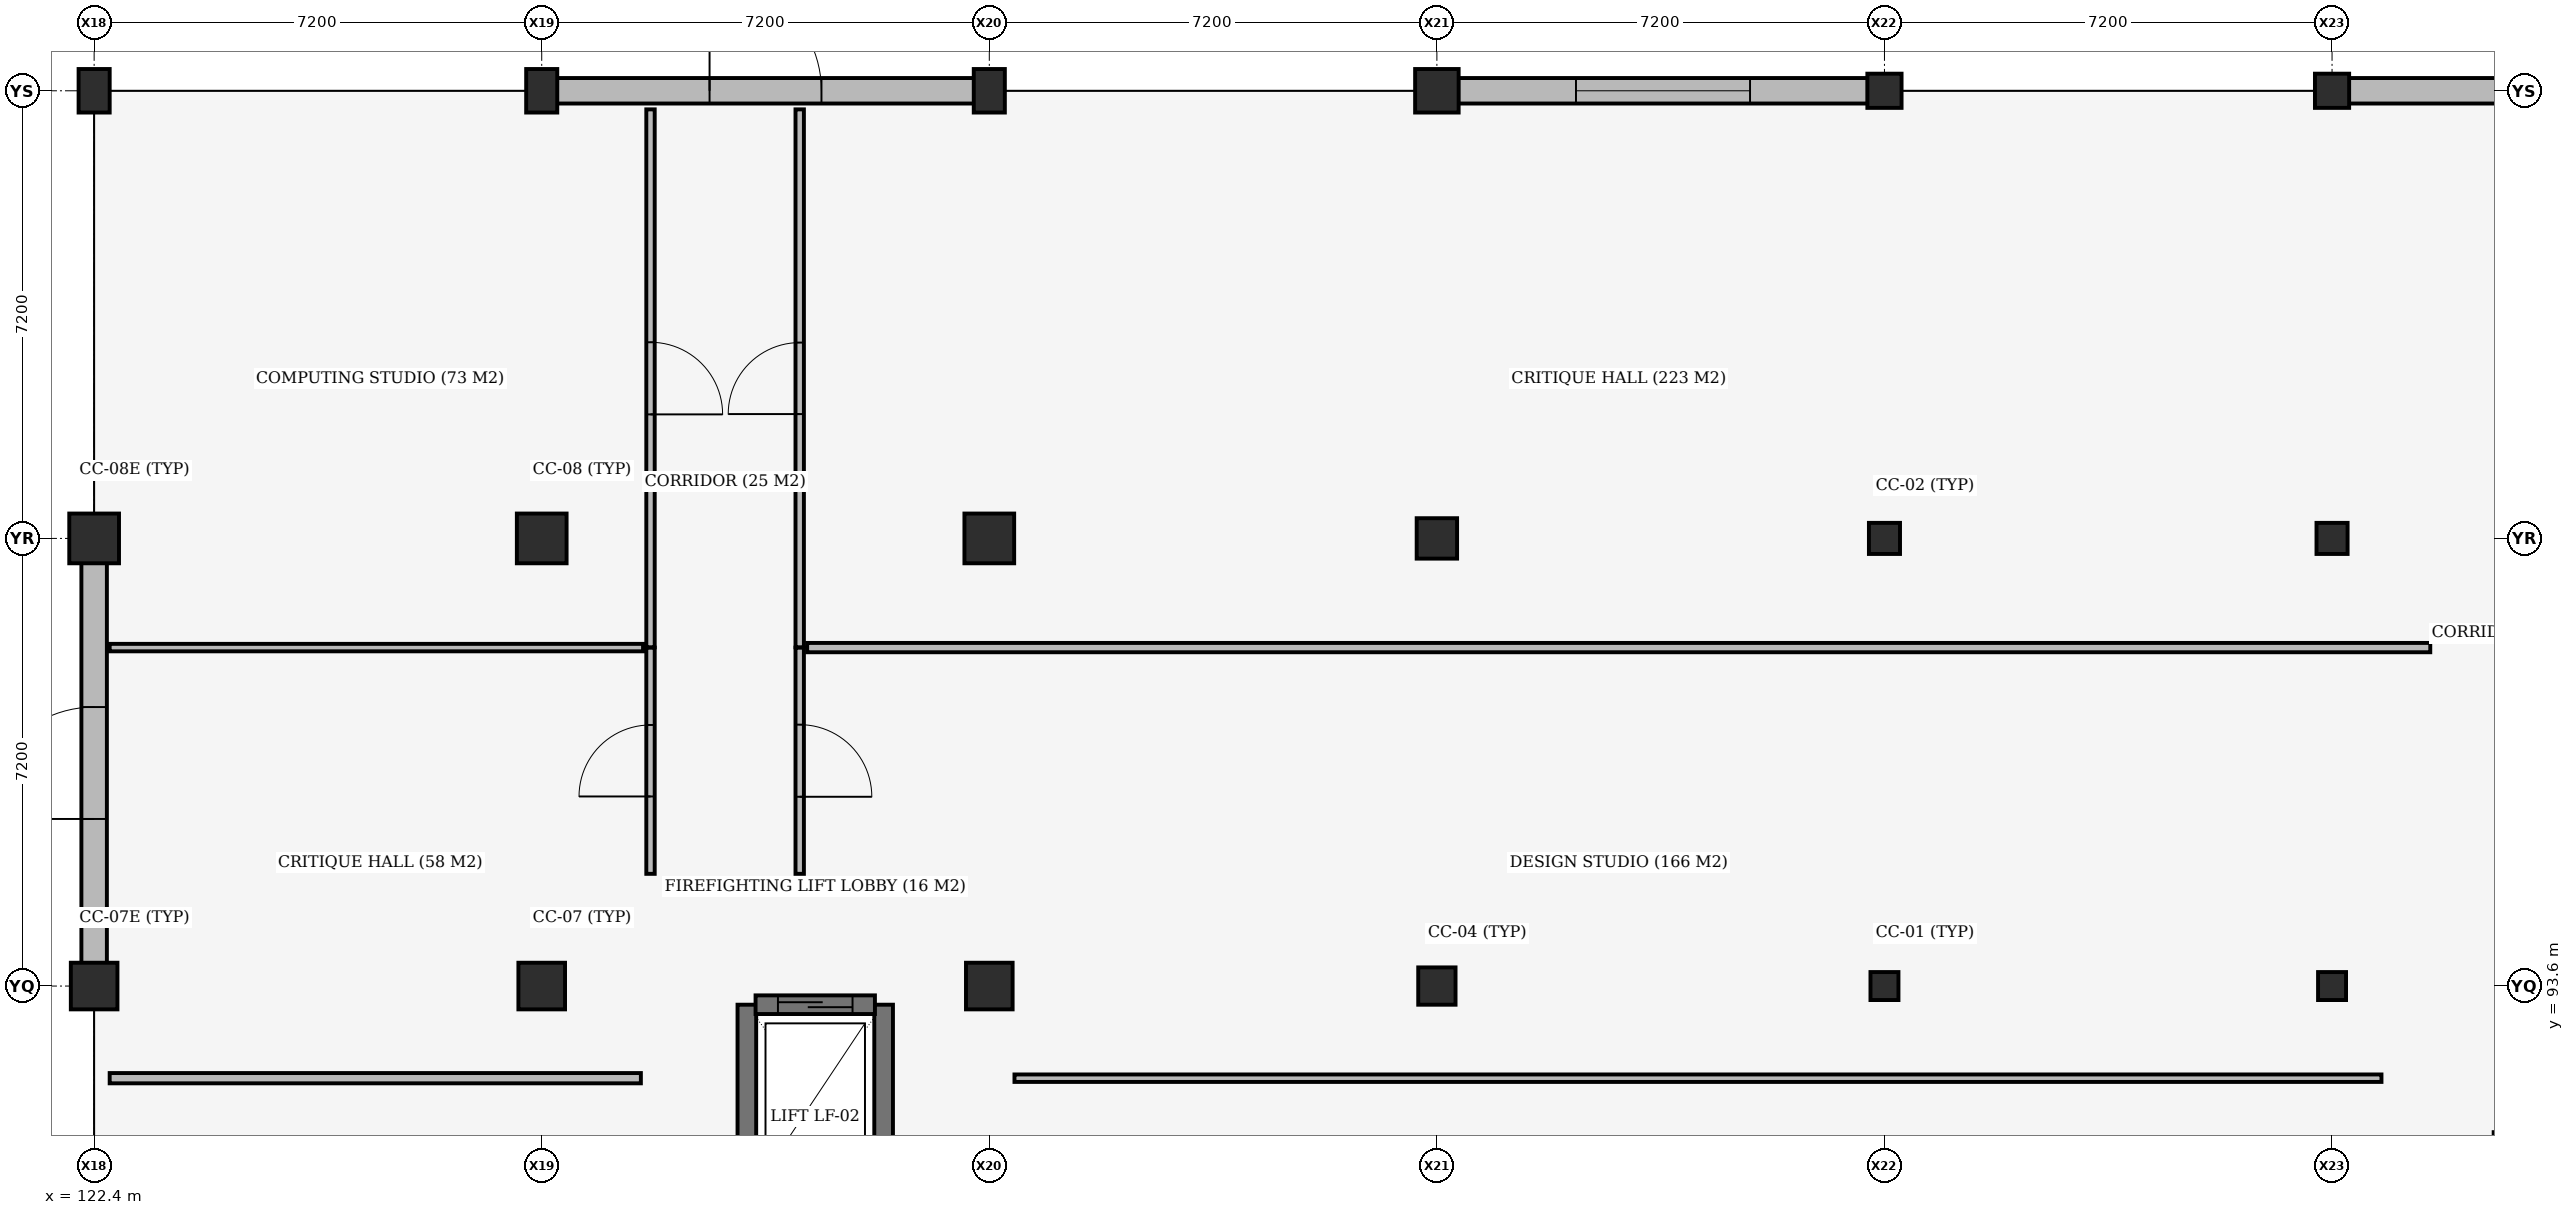
"""IFC4 building model, lengths in metres.
Left out: names, types, materials, properties, quantities, classifications, styles, units other than length and angle.
Written with IfcOpenShell. Run it as: python <this file> out.ifc"""

import sys

from ifc_helpers import new_model, si_unit, direction, frame, frame_2d, origin, origin_2d, place, context, subcontext, project, spatial, rectangle, extrude, element, fill, save


model = new_model("IFC4")
c1 = context("Model", 3, precision=1e-05, world=origin(), true_north=direction((0.0, 1.0)))
c2 = subcontext(c1, "Body", "Model", "MODEL_VIEW")
j1 = project(units=[si_unit("LENGTHUNIT", "METRE"), si_unit("PLANEANGLEUNIT", "RADIAN")], contexts=[c1])
p1 = place(None, origin())
s1 = spatial("IfcSite", under=j1, at=p1, CompositionType="ELEMENT")
p2 = place(p1, origin())
s2 = spatial("IfcBuilding", under=s1, at=p2, CompositionType="ELEMENT")
p3 = place(p2, origin())
s3 = spatial("IfcBuildingStorey", under=s2, at=p3, CompositionType="ELEMENT", Elevation=0.0)
p4 = place(p3, frame((122.4, 93.6, 0.0), z_axis=(0.0, 0.0, 1.0), x_axis=(1.0, 0.0, 0.0)))
e1 = element("IfcColumn", 1, at=p4, inside=s3, PredefinedType="COLUMN", context=c2, shape_type="SweptSolid", body=[
    extrude(rectangle(XDim=0.75, YDim=0.75, at=origin_2d()), origin(), (0.0, 0.0, 1.0), 5.1),
])
p5 = place(p3, frame((122.4, 100.8, 0.0), z_axis=(0.0, 0.0, 1.0), x_axis=(1.0, 0.0, 0.0)))
e2 = element("IfcColumn", 2, at=p5, inside=s3, PredefinedType="COLUMN", context=c2, shape_type="SweptSolid", body=[
    extrude(rectangle(XDim=0.8, YDim=0.8, at=origin_2d()), origin(), (0.0, 0.0, 1.0), 5.1),
])
p6 = place(p3, frame((122.4, 108.0, 0.0), z_axis=(0.0, 0.0, 1.0), x_axis=(1.0, 0.0, 0.0)))
e3 = element("IfcColumn", 3, at=p6, inside=s3, PredefinedType="COLUMN", context=c2, shape_type="SweptSolid", body=[
    extrude(rectangle(XDim=0.5, YDim=0.7, at=origin_2d()), origin(), (0.0, 0.0, 1.0), 5.1),
])
p7 = place(p3, frame((129.6, 93.6, 0.0), z_axis=(0.0, 0.0, 1.0), x_axis=(1.0, 0.0, 0.0)))
e4 = element("IfcColumn", 4, at=p7, inside=s3, PredefinedType="COLUMN", context=c2, shape_type="SweptSolid", body=[
    extrude(rectangle(XDim=0.75, YDim=0.75, at=origin_2d()), origin(), (0.0, 0.0, 1.0), 5.1),
])
p8 = place(p3, frame((129.6, 100.8, 0.0), z_axis=(0.0, 0.0, 1.0), x_axis=(1.0, 0.0, 0.0)))
e5 = element("IfcColumn", 5, at=p8, inside=s3, PredefinedType="COLUMN", context=c2, shape_type="SweptSolid", body=[
    extrude(rectangle(XDim=0.8, YDim=0.8, at=origin_2d()), origin(), (0.0, 0.0, 1.0), 5.1),
])
p9 = place(p3, frame((129.6, 108.0, 0.0), z_axis=(0.0, 0.0, 1.0), x_axis=(1.0, 0.0, 0.0)))
e6 = element("IfcColumn", 6, at=p9, inside=s3, PredefinedType="COLUMN", context=c2, shape_type="SweptSolid", body=[
    extrude(rectangle(XDim=0.5, YDim=0.7, at=origin_2d()), origin(), (0.0, 0.0, 1.0), 5.1),
])
p10 = place(p3, frame((136.8, 93.6, 0.0), z_axis=(0.0, 0.0, 1.0), x_axis=(1.0, 0.0, 0.0)))
e7 = element("IfcColumn", 7, at=p10, inside=s3, PredefinedType="COLUMN", context=c2, shape_type="SweptSolid", body=[
    extrude(rectangle(XDim=0.75, YDim=0.75, at=origin_2d()), origin(), (0.0, 0.0, 1.0), 5.1),
])
p11 = place(p3, frame((136.8, 100.8, 0.0), z_axis=(0.0, 0.0, 1.0), x_axis=(1.0, 0.0, 0.0)))
e8 = element("IfcColumn", 8, at=p11, inside=s3, PredefinedType="COLUMN", context=c2, shape_type="SweptSolid", body=[
    extrude(rectangle(XDim=0.8, YDim=0.8, at=origin_2d()), origin(), (0.0, 0.0, 1.0), 5.1),
])
p12 = place(p3, frame((136.8, 108.0, 0.0), z_axis=(0.0, 0.0, 1.0), x_axis=(1.0, 0.0, 0.0)))
e9 = element("IfcColumn", 9, at=p12, inside=s3, PredefinedType="COLUMN", context=c2, shape_type="SweptSolid", body=[
    extrude(rectangle(XDim=0.5, YDim=0.7, at=origin_2d()), origin(), (0.0, 0.0, 1.0), 5.1),
])
p13 = place(p3, frame((144.0, 93.6, 0.0), z_axis=(0.0, 0.0, 1.0), x_axis=(1.0, 0.0, 0.0)))
e10 = element("IfcColumn", 10, at=p13, inside=s3, PredefinedType="COLUMN", context=c2, shape_type="SweptSolid", body=[
    extrude(rectangle(XDim=0.6, YDim=0.6, at=origin_2d()), origin(), (0.0, 0.0, 1.0), 5.1),
])
p14 = place(p3, frame((144.0, 100.8, 0.0), z_axis=(0.0, 0.0, 1.0), x_axis=(1.0, 0.0, 0.0)))
e11 = element("IfcColumn", 11, at=p14, inside=s3, PredefinedType="COLUMN", context=c2, shape_type="SweptSolid", body=[
    extrude(rectangle(XDim=0.65, YDim=0.65, at=origin_2d()), origin(), (0.0, 0.0, 1.0), 5.1),
])
p15 = place(p3, frame((144.0, 108.0, 0.0), z_axis=(0.0, 0.0, 1.0), x_axis=(1.0, 0.0, 0.0)))
e12 = element("IfcColumn", 12, at=p15, inside=s3, PredefinedType="COLUMN", context=c2, shape_type="SweptSolid", body=[
    extrude(rectangle(XDim=0.7, YDim=0.7, at=origin_2d()), origin(), (0.0, 0.0, 1.0), 5.1),
])
p16 = place(p3, frame((151.2, 93.6, 0.0), z_axis=(0.0, 0.0, 1.0), x_axis=(1.0, 0.0, 0.0)))
e13 = element("IfcColumn", 13, at=p16, inside=s3, PredefinedType="COLUMN", context=c2, shape_type="SweptSolid", body=[
    extrude(rectangle(XDim=0.45, YDim=0.45, at=origin_2d()), origin(), (0.0, 0.0, 1.0), 5.1),
])
p17 = place(p3, frame((151.2, 100.8, 0.0), z_axis=(0.0, 0.0, 1.0), x_axis=(1.0, 0.0, 0.0)))
e14 = element("IfcColumn", 14, at=p17, inside=s3, PredefinedType="COLUMN", context=c2, shape_type="SweptSolid", body=[
    extrude(rectangle(XDim=0.5, YDim=0.5, at=origin_2d()), origin(), (0.0, 0.0, 1.0), 5.1),
])
p18 = place(p3, frame((151.2, 108.0, 0.0), z_axis=(0.0, 0.0, 1.0), x_axis=(1.0, 0.0, 0.0)))
e15 = element("IfcColumn", 15, at=p18, inside=s3, PredefinedType="COLUMN", context=c2, shape_type="SweptSolid", body=[
    extrude(rectangle(XDim=0.55, YDim=0.55, at=origin_2d()), origin(), (0.0, 0.0, 1.0), 5.1),
])
p19 = place(p3, frame((158.4, 93.6, 0.0), z_axis=(0.0, 0.0, 1.0), x_axis=(1.0, 0.0, 0.0)))
e16 = element("IfcColumn", 16, at=p19, inside=s3, PredefinedType="COLUMN", context=c2, shape_type="SweptSolid", body=[
    extrude(rectangle(XDim=0.45, YDim=0.45, at=origin_2d()), origin(), (0.0, 0.0, 1.0), 5.1),
])
p20 = place(p3, frame((158.4, 100.8, 0.0), z_axis=(0.0, 0.0, 1.0), x_axis=(1.0, 0.0, 0.0)))
e17 = element("IfcColumn", 17, at=p20, inside=s3, PredefinedType="COLUMN", context=c2, shape_type="SweptSolid", body=[
    extrude(rectangle(XDim=0.5, YDim=0.5, at=origin_2d()), origin(), (0.0, 0.0, 1.0), 5.1),
])
p21 = place(p3, frame((158.4, 108.0, 0.0), z_axis=(0.0, 0.0, 1.0), x_axis=(1.0, 0.0, 0.0)))
e18 = element("IfcColumn", 18, at=p21, inside=s3, PredefinedType="COLUMN", context=c2, shape_type="SweptSolid", body=[
    extrude(rectangle(XDim=0.55, YDim=0.55, at=origin_2d()), origin(), (0.0, 0.0, 1.0), 5.1),
])
for number, where, z_axis, x_axis in (
    (19, (132.9, 93.3, 0.0), (0.0, 0.0, 1.0), (0.0, -1.0, 0.0)),
    (20, (135.1, 90.3, 0.0), (0.0, 0.0, 1.0), (0.0, 1.0, 0.0)),
):
    element("IfcWall", number, at=place(p3, frame(where, z_axis=z_axis, x_axis=x_axis)), inside=s3, PredefinedType="SHEAR", context=c2, shape_type="SweptSolid", body=[
        extrude(rectangle(XDim=3.0, YDim=0.3, at=frame_2d((1.5, 0.0))), origin(), (0.0, 0.0, 1.0), 5.1),
    ])
p22 = place(p3, frame((163.0, 91.1, 0.0), z_axis=(0.0, 0.0, 1.0), x_axis=(-1.0, 0.0, 0.0)))
e21 = element("IfcWall", 21, at=p22, inside=s3, PredefinedType="SHEAR", context=c2, shape_type="SweptSolid", body=[
    extrude(rectangle(XDim=2.0, YDim=0.3, at=frame_2d((1.0, 0.0))), origin(), (0.0, 0.0, 1.0), 5.1),
])
p23 = place(p3, frame((129.842, 108.0, 0.0), z_axis=(0.0, 0.0, 1.0), x_axis=(1.0, 0.0, 0.0)))
e22 = element("IfcWall", 22, at=p23, inside=s3, PredefinedType="STANDARD", context=c2, shape_type="SweptSolid", body=[
    extrude(rectangle(XDim=6.716, YDim=0.41, at=frame_2d((3.358, 0.0))), origin(), (0.0, 0.0, 1.0), 4.35),
])
p24 = place(p23, frame((2.458, 0.0, 0.0)))
e23 = element("IfcOpeningElement", 23, at=p24, cuts=e22, PredefinedType="OPENING", context=c2, shape_type="SweptSolid", body=[
    extrude(rectangle(XDim=1.8, YDim=2.2, at=frame_2d((0.9, 1.1))), frame((0.0, 0.215, 0.0), z_axis=(0.0, -1.0, 0.0), x_axis=(1.0, 0.0, 0.0)), (0.0, 0.0, 1.0), 0.43),
])
p25 = place(p3, frame((144.342, 108.0, 0.0), z_axis=(0.0, 0.0, 1.0), x_axis=(1.0, 0.0, 0.0)))
e24 = element("IfcWall", 24, at=p25, inside=s3, PredefinedType="STANDARD", context=c2, shape_type="SweptSolid", body=[
    extrude(rectangle(XDim=6.591, YDim=0.41, at=frame_2d((3.295, 0.0))), origin(), (0.0, 0.0, 1.0), 4.35),
])
p26 = place(p25, frame((1.896, 0.0, 0.85)))
e25 = element("IfcOpeningElement", 25, at=p26, cuts=e24, PredefinedType="OPENING", context=c2, shape_type="SweptSolid", body=[
    extrude(rectangle(XDim=2.8, YDim=2.4, at=frame_2d((1.4, 1.2))), frame((0.0, 0.215, 0.0), z_axis=(0.0, -1.0, 0.0), x_axis=(1.0, 0.0, 0.0)), (0.0, 0.0, 1.0), 0.43),
])
p27 = place(p3, frame((158.667, 108.0, 0.0), z_axis=(0.0, 0.0, 1.0), x_axis=(1.0, 0.0, 0.0)))
e26 = element("IfcWall", 26, at=p27, inside=s3, PredefinedType="STANDARD", context=c2, shape_type="SweptSolid", body=[
    extrude(rectangle(XDim=6.666, YDim=0.41, at=frame_2d((3.333, 0.0))), origin(), (0.0, 0.0, 1.0), 4.5),
])
p28 = place(p27, frame((2.433, 0.0, 0.0)))
e27 = element("IfcOpeningElement", 27, at=p28, cuts=e26, PredefinedType="OPENING", context=c2, shape_type="SweptSolid", body=[
    extrude(rectangle(XDim=1.8, YDim=2.2, at=frame_2d((0.9, 1.1))), frame((0.0, 0.215, 0.0), z_axis=(0.0, -1.0, 0.0), x_axis=(1.0, 0.0, 0.0)), (0.0, 0.0, 1.0), 0.43),
])
p29 = place(p3, frame((122.4, 93.967, 0.0), z_axis=(0.0, 0.0, 1.0), x_axis=(0.0, 1.0, 0.0)))
e28 = element("IfcWall", 28, at=p29, inside=s3, PredefinedType="STANDARD", context=c2, shape_type="SweptSolid", body=[
    extrude(rectangle(XDim=6.441, YDim=0.41, at=frame_2d((3.22, 0.0))), origin(), (0.0, 0.0, 1.0), 4.3),
])
p30 = place(p29, frame((2.321, 0.0, 0.0)))
e29 = element("IfcOpeningElement", 29, at=p30, cuts=e28, PredefinedType="OPENING", context=c2, shape_type="SweptSolid", body=[
    extrude(rectangle(XDim=1.8, YDim=2.2, at=frame_2d((0.9, 1.1))), frame((0.0, 0.215, 0.0), z_axis=(0.0, -1.0, 0.0), x_axis=(1.0, 0.0, 0.0)), (0.0, 0.0, 1.0), 0.43),
])
p31 = place(p3, frame((133.04, 93.3, 0.0), z_axis=(0.0, 0.0, 1.0), x_axis=(1.0, 0.0, 0.0)))
e30 = element("IfcWall", 30, at=p31, inside=s3, PredefinedType="SHEAR", context=c2, shape_type="SweptSolid", body=[
    extrude(rectangle(XDim=1.92, YDim=0.3, at=frame_2d((0.96, 0.0))), origin(), (0.0, 0.0, 1.0), 5.1),
])
p32 = place(p31, frame((0.36, 0.0, 0.0)))
e31 = element("IfcOpeningElement", 31, at=p32, cuts=e30, PredefinedType="OPENING", context=c2, shape_type="SweptSolid", body=[
    extrude(rectangle(XDim=1.2, YDim=2.1, at=frame_2d((0.6, 1.05))), frame((0.0, 0.16, 0.0), z_axis=(0.0, -1.0, 0.0), x_axis=(1.0, 0.0, 0.0)), (0.0, 0.0, 1.0), 0.32),
])
p33 = place(p3, frame((122.65, 92.118, 0.0), z_axis=(0.0, 0.0, 1.0), x_axis=(1.0, 0.0, 0.0)))
e32 = element("IfcWall", 32, at=p33, inside=s3, PredefinedType="PARTITIONING", context=c2, shape_type="SweptSolid", body=[
    extrude(rectangle(XDim=8.545, YDim=0.165, at=frame_2d((4.272, 0.0))), origin(), (0.0, 0.0, 1.0), 4.45),
])
p34 = place(p3, frame((131.35, 95.405, 0.0), z_axis=(0.0, 0.0, 1.0), x_axis=(0.0, 1.0, 0.0)))
e33 = element("IfcWall", 33, at=p34, inside=s3, PredefinedType="PARTITIONING", context=c2, shape_type="SweptSolid", body=[
    extrude(rectangle(XDim=3.639, YDim=0.135, at=frame_2d((1.819, 0.0))), origin(), (0.0, 0.0, 1.0), 5.1),
])
p35 = place(p34, frame((1.244, 0.0, 0.0)))
e34 = element("IfcOpeningElement", 34, at=p35, cuts=e33, PredefinedType="OPENING", context=c2, shape_type="SweptSolid", body=[
    extrude(rectangle(XDim=1.15, YDim=2.2, at=frame_2d((0.575, 1.1))), frame((0.0, 0.077, 0.0), z_axis=(0.0, -1.0, 0.0), x_axis=(1.0, 0.0, 0.0)), (0.0, 0.0, 1.0), 0.155),
])
p36 = place(p3, frame((122.65, 99.044, 0.0), z_axis=(0.0, 0.0, 1.0), x_axis=(1.0, 0.0, 0.0)))
e35 = element("IfcWall", 35, at=p36, inside=s3, PredefinedType="PARTITIONING", context=c2, shape_type="SweptSolid", body=[
    extrude(rectangle(XDim=8.58, YDim=0.12, at=frame_2d((4.29, 0.0))), origin(), (0.0, 0.0, 1.0), 4.4),
])
p37 = place(p3, frame((131.35, 99.049, 0.0), z_axis=(0.0, 0.0, 1.0), x_axis=(0.0, 1.0, 0.0)))
e36 = element("IfcWall", 36, at=p37, inside=s3, PredefinedType="PARTITIONING", context=c2, shape_type="SweptSolid", body=[
    extrude(rectangle(XDim=8.652, YDim=0.135, at=frame_2d((4.326, 0.0))), origin(), (0.0, 0.0, 1.0), 4.3),
])
p38 = place(p37, frame((3.746, 0.0, 0.0)))
e37 = element("IfcOpeningElement", 37, at=p38, cuts=e36, PredefinedType="OPENING", context=c2, shape_type="SweptSolid", body=[
    extrude(rectangle(XDim=1.16, YDim=2.2, at=frame_2d((0.58, 1.1))), frame((0.0, 0.077, 0.0), z_axis=(0.0, -1.0, 0.0), x_axis=(1.0, 0.0, 0.0)), (0.0, 0.0, 1.0), 0.155),
])
p39 = place(p3, frame((137.205, 92.118, 0.0), z_axis=(0.0, 0.0, 1.0), x_axis=(1.0, 0.0, 0.0)))
e38 = element("IfcWall", 38, at=p39, inside=s3, PredefinedType="PARTITIONING", context=c2, shape_type="SweptSolid", body=[
    extrude(rectangle(XDim=21.99, YDim=0.12, at=frame_2d((10.995, 0.0))), origin(), (0.0, 0.0, 1.0), 4.3),
])
p40 = place(p3, frame((133.75, 95.405, 0.0), z_axis=(0.0, 0.0, 1.0), x_axis=(0.0, 1.0, 0.0)))
e39 = element("IfcWall", 39, at=p40, inside=s3, PredefinedType="PARTITIONING", context=c2, shape_type="SweptSolid", body=[
    extrude(rectangle(XDim=3.639, YDim=0.135, at=frame_2d((1.819, 0.0))), origin(), (0.0, 0.0, 1.0), 5.1),
])
p41 = place(p40, frame((1.24, 0.0, 0.0)))
e40 = element("IfcOpeningElement", 40, at=p41, cuts=e39, PredefinedType="OPENING", context=c2, shape_type="SweptSolid", body=[
    extrude(rectangle(XDim=1.16, YDim=2.2, at=frame_2d((0.58, 1.1))), frame((0.0, 0.077, 0.0), z_axis=(0.0, -1.0, 0.0), x_axis=(1.0, 0.0, 0.0)), (0.0, 0.0, 1.0), 0.155),
])
p42 = place(p3, frame((133.87, 99.044, 0.0), z_axis=(0.0, 0.0, 1.0), x_axis=(1.0, 0.0, 0.0)))
e41 = element("IfcWall", 41, at=p42, inside=s3, PredefinedType="PARTITIONING", context=c2, shape_type="SweptSolid", body=[
    extrude(rectangle(XDim=26.11, YDim=0.15, at=frame_2d((13.055, 0.0))), origin(), (0.0, 0.0, 1.0), 4.45),
])
p43 = place(p3, frame((133.75, 99.049, 0.0), z_axis=(0.0, 0.0, 1.0), x_axis=(0.0, 1.0, 0.0)))
e42 = element("IfcWall", 42, at=p43, inside=s3, PredefinedType="PARTITIONING", context=c2, shape_type="SweptSolid", body=[
    extrude(rectangle(XDim=8.652, YDim=0.135, at=frame_2d((4.326, 0.0))), origin(), (0.0, 0.0, 1.0), 4.3),
])
p44 = place(p43, frame((3.751, 0.0, 0.0)))
e43 = element("IfcOpeningElement", 43, at=p44, cuts=e42, PredefinedType="OPENING", context=c2, shape_type="SweptSolid", body=[
    extrude(rectangle(XDim=1.15, YDim=2.2, at=frame_2d((0.575, 1.1))), frame((0.0, 0.077, 0.0), z_axis=(0.0, -1.0, 0.0), x_axis=(1.0, 0.0, 0.0)), (0.0, 0.0, 1.0), 0.155),
])
p45 = place(p24, origin())
e44 = element("IfcDoor", 44, at=p45, inside=s3, OperationType="DOUBLE_DOOR_SINGLE_SWING", PredefinedType="DOOR", context=c2, shape_type="SweptSolid", body=[
    extrude(rectangle(XDim=1.8, YDim=2.2, at=frame_2d((0.9, 1.1))), frame((0.0, 0.025, 0.0), z_axis=(0.0, -1.0, 0.0), x_axis=(1.0, 0.0, 0.0)), (0.0, 0.0, 1.0), 0.05),
])
fill(e23, e44)
p46 = place(p26, origin())
e45 = element("IfcWindow", 45, at=p46, inside=s3, PartitioningType="DOUBLE_PANEL_VERTICAL", PredefinedType="WINDOW", context=c2, shape_type="SweptSolid", body=[
    extrude(rectangle(XDim=2.8, YDim=2.4, at=frame_2d((1.4, 1.2))), frame((0.0, 0.03, 0.0), z_axis=(0.0, -1.0, 0.0), x_axis=(1.0, 0.0, 0.0)), (0.0, 0.0, 1.0), 0.06),
])
fill(e25, e45)
p47 = place(p30, origin())
e46 = element("IfcDoor", 46, at=p47, inside=s3, OperationType="DOUBLE_DOOR_SINGLE_SWING", PredefinedType="DOOR", context=c2, shape_type="SweptSolid", body=[
    extrude(rectangle(XDim=1.8, YDim=2.2, at=frame_2d((0.9, 1.1))), frame((0.0, 0.025, 0.0), z_axis=(0.0, -1.0, 0.0), x_axis=(1.0, 0.0, 0.0)), (0.0, 0.0, 1.0), 0.05),
])
fill(e29, e46)
p48 = place(p32, origin())
e47 = element("IfcDoor", 47, at=p48, inside=s3, OperationType="SLIDING_TO_LEFT", PredefinedType="DOOR", context=c2, shape_type="SweptSolid", body=[
    extrude(rectangle(XDim=1.2, YDim=2.1, at=frame_2d((0.6, 1.05))), frame((0.0, 0.025, 0.0), z_axis=(0.0, -1.0, 0.0), x_axis=(1.0, 0.0, 0.0)), (0.0, 0.0, 1.0), 0.05),
])
fill(e31, e47)
p49 = place(p35, origin())
e48 = element("IfcDoor", 48, at=p49, inside=s3, OperationType="SINGLE_SWING_LEFT", PredefinedType="DOOR", context=c2, shape_type="SweptSolid", body=[
    extrude(rectangle(XDim=1.15, YDim=2.2, at=frame_2d((0.575, 1.1))), frame((0.0, 0.025, 0.0), z_axis=(0.0, -1.0, 0.0), x_axis=(1.0, 0.0, 0.0)), (0.0, 0.0, 1.0), 0.05),
])
fill(e34, e48)
p50 = place(p38, origin())
e49 = element("IfcDoor", 49, at=p50, inside=s3, OperationType="SINGLE_SWING_RIGHT", PredefinedType="DOOR", context=c2, shape_type="SweptSolid", body=[
    extrude(rectangle(XDim=1.16, YDim=2.2, at=frame_2d((0.58, 1.1))), frame((0.0, 0.025, 0.0), z_axis=(0.0, -1.0, 0.0), x_axis=(1.0, 0.0, 0.0)), (0.0, 0.0, 1.0), 0.05),
])
fill(e37, e49)
p51 = place(p41, origin())
e50 = element("IfcDoor", 50, at=p51, inside=s3, OperationType="SINGLE_SWING_RIGHT", PredefinedType="DOOR", context=c2, shape_type="SweptSolid", body=[
    extrude(rectangle(XDim=1.16, YDim=2.2, at=frame_2d((0.58, 1.1))), frame((0.0, 0.025, 0.0), z_axis=(0.0, -1.0, 0.0), x_axis=(1.0, 0.0, 0.0)), (0.0, 0.0, 1.0), 0.05),
])
fill(e40, e50)
p52 = place(p44, origin())
e51 = element("IfcDoor", 51, at=p52, inside=s3, OperationType="SINGLE_SWING_LEFT", PredefinedType="DOOR", context=c2, shape_type="SweptSolid", body=[
    extrude(rectangle(XDim=1.15, YDim=2.2, at=frame_2d((0.575, 1.1))), frame((0.0, 0.025, 0.0), z_axis=(0.0, -1.0, 0.0), x_axis=(1.0, 0.0, 0.0)), (0.0, 0.0, 1.0), 0.05),
])
fill(e43, e51)
save(model, sys.argv[1])
